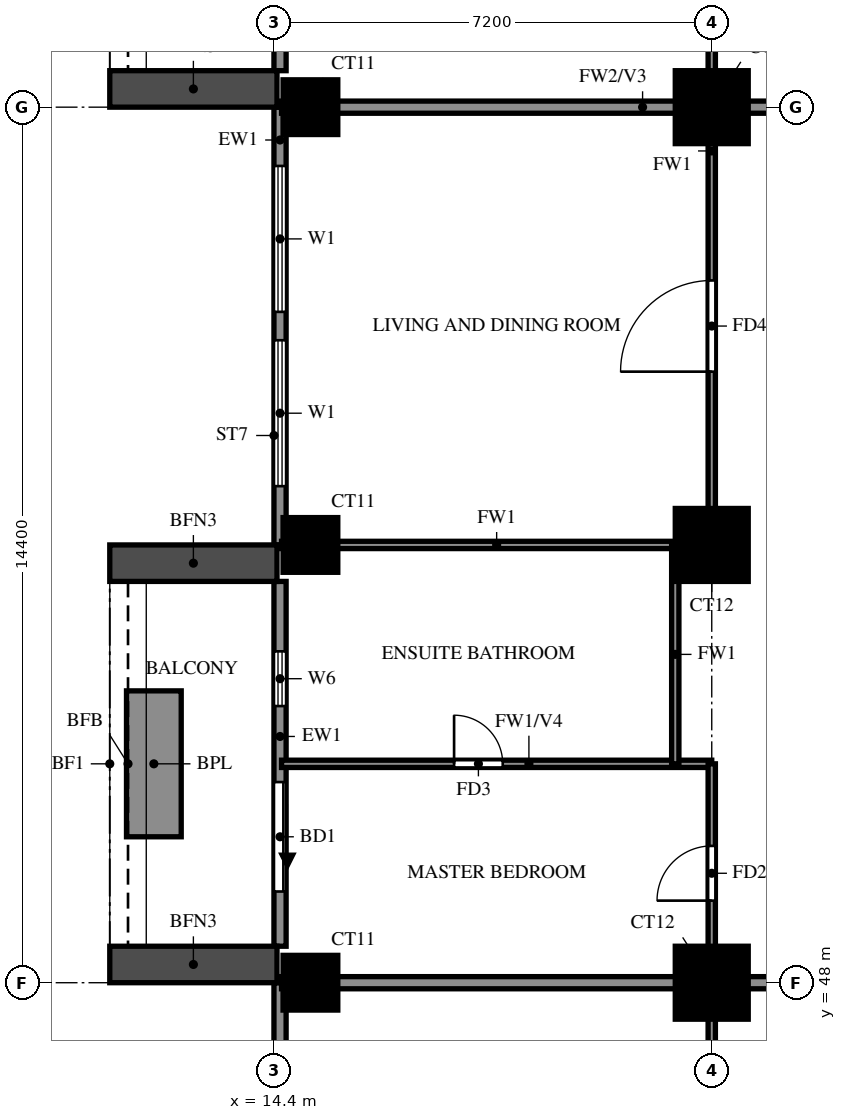
"""IFC4 building model, lengths in metres.
Left out: names, types, materials, properties, quantities, classifications, styles, units other than length and angle.
Written with IfcOpenShell. Run it as: python <this file> out.ifc"""

import sys

from ifc_helpers import new_model, si_unit, direction, frame, frame_2d, origin, origin_2d, place, context, subcontext, project, spatial, rectangle, extrude, source, transform, mapped, element, fill, save


model = new_model("IFC4")
c1 = context("Model", 3, precision=1e-05, world=origin(), true_north=direction((0.0, 1.0)))
c2 = subcontext(c1, "Body", "Model", "MODEL_VIEW")
j1 = project(units=[si_unit("LENGTHUNIT", "METRE"), si_unit("PLANEANGLEUNIT", "RADIAN")], contexts=[c1])
p1 = place(None, origin())
s1 = spatial("IfcSite", under=j1, at=p1, CompositionType="ELEMENT")
p2 = place(p1, origin())
s2 = spatial("IfcBuilding", under=s1, at=p2, CompositionType="ELEMENT")
p3 = place(p2, frame((0.0, 0.0, 100.5)))
s3 = spatial("IfcBuildingStorey", under=s2, at=p3, CompositionType="ELEMENT", Elevation=100.5)
m1 = source(origin(), c2, "Body", "SweptSolid", [
    extrude(rectangle(XDim=0.9, YDim=0.9, at=origin_2d()), origin(), (0.0, 0.0, 1.0), 3.18),
])
p4 = place(p3, frame((15.0, 48.0, 0.0), z_axis=(0.0, 0.0, 1.0), x_axis=(1.0, 0.0, 0.0)))
e1 = element("IfcColumn", 1, at=p4, inside=s3, PredefinedType="COLUMN", context=c2, shape_type="MappedRepresentation", body=[
    mapped(m1, transform((0.0, 0.0, 0.0))),
])
m2 = source(origin(), c2, "Body", "SweptSolid", [
    extrude(rectangle(XDim=1.2, YDim=1.2, at=origin_2d()), origin(), (0.0, 0.0, 1.0), 3.18),
])
p5 = place(p3, frame((21.6, 48.0, 0.0), z_axis=(0.0, 0.0, 1.0), x_axis=(1.0, 0.0, 0.0)))
e2 = element("IfcColumn", 2, at=p5, inside=s3, PredefinedType="COLUMN", context=c2, shape_type="MappedRepresentation", body=[
    mapped(m2, transform((0.0, 0.0, 0.0))),
])
p6 = place(p3, frame((15.0, 55.2, 0.0), z_axis=(0.0, 0.0, 1.0), x_axis=(1.0, 0.0, 0.0)))
e3 = element("IfcColumn", 3, at=p6, inside=s3, PredefinedType="COLUMN", context=c2, shape_type="MappedRepresentation", body=[
    mapped(m1, transform((0.0, 0.0, 0.0))),
])
p7 = place(p3, frame((21.6, 55.2, 0.0), z_axis=(0.0, 0.0, 1.0), x_axis=(1.0, 0.0, 0.0)))
e4 = element("IfcColumn", 4, at=p7, inside=s3, PredefinedType="COLUMN", context=c2, shape_type="MappedRepresentation", body=[
    mapped(m2, transform((0.0, 0.0, 0.0))),
])
p8 = place(p3, frame((15.0, 62.4, 0.0), z_axis=(0.0, 0.0, 1.0), x_axis=(1.0, 0.0, 0.0)))
e5 = element("IfcColumn", 5, at=p8, inside=s3, PredefinedType="COLUMN", context=c2, shape_type="MappedRepresentation", body=[
    mapped(m1, transform((0.0, 0.0, 0.0))),
])
p9 = place(p3, frame((21.6, 62.4, 0.0), z_axis=(0.0, 0.0, 1.0), x_axis=(1.0, 0.0, 0.0)))
e6 = element("IfcColumn", 6, at=p9, inside=s3, PredefinedType="COLUMN", context=c2, shape_type="MappedRepresentation", body=[
    mapped(m2, transform((0.0, 0.0, 0.0))),
])
p10 = place(p3, frame((14.5, 69.0, 0.0), z_axis=(0.0, 0.0, 1.0), x_axis=(0.0, -1.0, 0.0)))
e7 = element("IfcWall", 7, at=p10, inside=s3, PredefinedType="SOLIDWALL", context=c2, shape_type="SweptSolid", body=[
    extrude(rectangle(XDim=6.0, YDim=0.2, at=frame_2d((3.0, 0.0))), origin(), (0.0, 0.0, 1.0), 3.18),
])
p11 = place(p10, frame((0.9, 0.0, 0.0)))
e8 = element("IfcOpeningElement", 8, at=p11, cuts=e7, PredefinedType="OPENING", context=c2, shape_type="SweptSolid", body=[
    extrude(rectangle(XDim=1.8, YDim=2.4, at=frame_2d((0.9, 1.2))), frame((0.0, 0.11, 0.0), z_axis=(0.0, -1.0, 0.0), x_axis=(1.0, 0.0, 0.0)), (0.0, 0.0, 1.0), 0.22),
])
p12 = place(p10, frame((3.5, 0.0, 0.6)))
e9 = element("IfcOpeningElement", 9, at=p12, cuts=e7, PredefinedType="OPENING", context=c2, shape_type="SweptSolid", body=[
    extrude(rectangle(XDim=1.8, YDim=2.4, at=frame_2d((0.9, 1.2))), frame((0.0, 0.11, 0.0), z_axis=(0.0, -1.0, 0.0), x_axis=(1.0, 0.0, 0.0)), (0.0, 0.0, 1.0), 0.22),
])
p13 = place(p3, frame((14.5, 62.4, 0.0), z_axis=(0.0, 0.0, 1.0), x_axis=(0.0, -1.0, 0.0)))
e10 = element("IfcWall", 10, at=p13, inside=s3, PredefinedType="SOLIDWALL", context=c2, shape_type="SweptSolid", body=[
    extrude(rectangle(XDim=7.2, YDim=0.2, at=frame_2d((3.6, 0.0))), origin(), (0.0, 0.0, 1.0), 3.18),
])
p14 = place(p13, frame((0.967, 0.0, 0.6)))
e11 = element("IfcOpeningElement", 11, at=p14, cuts=e10, PredefinedType="OPENING", context=c2, shape_type="SweptSolid", body=[
    extrude(rectangle(XDim=2.4, YDim=2.4, at=frame_2d((1.2, 1.2))), frame((0.0, 0.11, 0.0), z_axis=(0.0, -1.0, 0.0), x_axis=(1.0, 0.0, 0.0)), (0.0, 0.0, 1.0), 0.22),
])
p15 = place(p13, frame((3.833, 0.0, 0.6)))
e12 = element("IfcOpeningElement", 12, at=p15, cuts=e10, PredefinedType="OPENING", context=c2, shape_type="SweptSolid", body=[
    extrude(rectangle(XDim=2.4, YDim=2.4, at=frame_2d((1.2, 1.2))), frame((0.0, 0.11, 0.0), z_axis=(0.0, -1.0, 0.0), x_axis=(1.0, 0.0, 0.0)), (0.0, 0.0, 1.0), 0.22),
])
p16 = place(p3, frame((14.5, 54.6, 0.0), z_axis=(0.0, 0.0, 1.0), x_axis=(0.0, -1.0, 0.0)))
e13 = element("IfcWall", 13, at=p16, inside=s3, PredefinedType="SOLIDWALL", context=c2, shape_type="SweptSolid", body=[
    extrude(rectangle(XDim=6.0, YDim=0.2, at=frame_2d((3.0, 0.0))), origin(), (0.0, 0.0, 1.0), 3.18),
])
p17 = place(p16, frame((3.3, 0.0, 0.0)))
e14 = element("IfcOpeningElement", 14, at=p17, cuts=e13, PredefinedType="OPENING", context=c2, shape_type="SweptSolid", body=[
    extrude(rectangle(XDim=1.8, YDim=2.4, at=frame_2d((0.9, 1.2))), frame((0.0, 0.11, 0.0), z_axis=(0.0, -1.0, 0.0), x_axis=(1.0, 0.0, 0.0)), (0.0, 0.0, 1.0), 0.22),
])
p18 = place(p16, frame((1.15, 0.0, 1.5)))
e15 = element("IfcOpeningElement", 15, at=p18, cuts=e13, PredefinedType="OPENING", context=c2, shape_type="SweptSolid", body=[
    extrude(rectangle(XDim=0.9, YDim=0.9, at=frame_2d((0.45, 0.45))), frame((0.0, 0.11, 0.0), z_axis=(0.0, -1.0, 0.0), x_axis=(1.0, 0.0, 0.0)), (0.0, 0.0, 1.0), 0.22),
])
p19 = place(p3, frame((14.5, 48.0, 0.0), z_axis=(0.0, 0.0, 1.0), x_axis=(0.0, -1.0, 0.0)))
e16 = element("IfcWall", 16, at=p19, inside=s3, PredefinedType="SOLIDWALL", context=c2, shape_type="SweptSolid", body=[
    extrude(rectangle(XDim=10.8, YDim=0.2, at=frame_2d((5.4, 0.0))), origin(), (0.0, 0.0, 1.0), 3.18),
])
p20 = place(p19, frame((0.967, 0.0, 0.6)))
e17 = element("IfcOpeningElement", 17, at=p20, cuts=e16, PredefinedType="OPENING", context=c2, shape_type="SweptSolid", body=[
    extrude(rectangle(XDim=2.4, YDim=2.4, at=frame_2d((1.2, 1.2))), frame((0.0, 0.11, 0.0), z_axis=(0.0, -1.0, 0.0), x_axis=(1.0, 0.0, 0.0)), (0.0, 0.0, 1.0), 0.22),
])
p21 = place(p19, frame((3.833, 0.0, 0.6)))
e18 = element("IfcOpeningElement", 18, at=p21, cuts=e16, PredefinedType="OPENING", context=c2, shape_type="SweptSolid", body=[
    extrude(rectangle(XDim=2.4, YDim=2.4, at=frame_2d((1.2, 1.2))), frame((0.0, 0.11, 0.0), z_axis=(0.0, -1.0, 0.0), x_axis=(1.0, 0.0, 0.0)), (0.0, 0.0, 1.0), 0.22),
])
p22 = place(p19, frame((8.2, 0.0, 0.6)))
e19 = element("IfcOpeningElement", 19, at=p22, cuts=e16, PredefinedType="OPENING", context=c2, shape_type="SweptSolid", body=[
    extrude(rectangle(XDim=1.8, YDim=2.4, at=frame_2d((0.9, 1.2))), frame((0.0, 0.11, 0.0), z_axis=(0.0, -1.0, 0.0), x_axis=(1.0, 0.0, 0.0)), (0.0, 0.0, 1.0), 0.22),
])
for number, where, z_axis, x_axis in (
    (20, (14.45, 62.7, 0.0), (0.0, 0.0, 1.0), (-1.0, 0.0, 0.0)),
    (21, (14.45, 54.9, 0.0), (0.0, 0.0, 1.0), (-1.0, 0.0, 0.0)),
    (22, (14.45, 48.3, 0.0), (0.0, 0.0, 1.0), (-1.0, 0.0, 0.0)),
):
    element("IfcWall", number, at=place(p3, frame(where, z_axis=z_axis, x_axis=x_axis)), inside=s3, PredefinedType="SOLIDWALL", context=c2, shape_type="SweptSolid", body=[
        extrude(rectangle(XDim=2.75, YDim=0.6, at=frame_2d((1.375, 0.0))), origin(), (0.0, 0.0, 1.0), 2.85),
    ])
p23 = place(p3, frame((12.425, 52.8, 0.0), z_axis=(0.0, 0.0, 1.0), x_axis=(0.0, -1.0, 0.0)))
e23 = element("IfcWall", 23, at=p23, inside=s3, PredefinedType="SOLIDWALL", context=c2, shape_type="SweptSolid", body=[
    extrude(rectangle(XDim=2.4, YDim=0.9, at=frame_2d((1.2, 0.0))), origin(), (0.0, 0.0, 1.0), 0.9),
])
p24 = place(p3, frame((14.525, 48.0, 0.0), z_axis=(0.0, 0.0, 1.0), x_axis=(1.0, 0.0, 0.0)))
e24 = element("IfcWall", 24, at=p24, inside=s3, PredefinedType="SOLIDWALL", context=c2, shape_type="SweptSolid", body=[
    extrude(rectangle(XDim=19.075, YDim=0.2, at=frame_2d((9.538, 0.0))), origin(), (0.0, 0.0, 1.0), 3.18),
])
p25 = place(p3, frame((14.525, 62.4, 0.0), z_axis=(0.0, 0.0, 1.0), x_axis=(1.0, 0.0, 0.0)))
e25 = element("IfcWall", 25, at=p25, inside=s3, PredefinedType="SOLIDWALL", context=c2, shape_type="SweptSolid", body=[
    extrude(rectangle(XDim=11.875, YDim=0.2, at=frame_2d((5.938, 0.0))), origin(), (0.0, 0.0, 1.0), 3.18),
])
p26 = place(p3, frame((14.525, 51.6, 0.0), z_axis=(0.0, 0.0, 1.0), x_axis=(1.0, 0.0, 0.0)))
e26 = element("IfcWall", 26, at=p26, inside=s3, PredefinedType="PARTITIONING", context=c2, shape_type="SweptSolid", body=[
    extrude(rectangle(XDim=7.075, YDim=0.12, at=frame_2d((3.538, 0.0))), origin(), (0.0, 0.0, 1.0), 2.28),
])
p27 = place(p26, frame((2.837, 0.0, 0.0)))
e27 = element("IfcOpeningElement", 27, at=p27, cuts=e26, PredefinedType="OPENING", context=c2, shape_type="SweptSolid", body=[
    extrude(rectangle(XDim=0.8, YDim=2.1, at=frame_2d((0.4, 1.05))), frame((0.0, 0.07, 0.0), z_axis=(0.0, -1.0, 0.0), x_axis=(1.0, 0.0, 0.0)), (0.0, 0.0, 1.0), 0.14),
])
p28 = place(p3, frame((14.525, 55.2, 0.0), z_axis=(0.0, 0.0, 1.0), x_axis=(1.0, 0.0, 0.0)))
e28 = element("IfcWall", 28, at=p28, inside=s3, PredefinedType="PARTITIONING", context=c2, shape_type="SweptSolid", body=[
    extrude(rectangle(XDim=7.075, YDim=0.12, at=frame_2d((3.538, 0.0))), origin(), (0.0, 0.0, 1.0), 3.18),
])
p29 = place(p3, frame((21.0, 51.6, 0.0), z_axis=(0.0, 0.0, 1.0), x_axis=(0.0, 1.0, 0.0)))
e29 = element("IfcWall", 29, at=p29, inside=s3, PredefinedType="PARTITIONING", context=c2, shape_type="SweptSolid", body=[
    extrude(rectangle(XDim=3.6, YDim=0.12, at=frame_2d((1.8, 0.0))), origin(), (0.0, 0.0, 1.0), 3.18),
])
p30 = place(p3, frame((21.6, 33.725, 0.0), z_axis=(0.0, 0.0, 1.0), x_axis=(0.0, 1.0, 0.0)))
e30 = element("IfcWall", 30, at=p30, inside=s3, PredefinedType="PARTITIONING", context=c2, shape_type="SweptSolid", body=[
    extrude(rectangle(XDim=17.875, YDim=0.12, at=frame_2d((8.938, 0.0))), origin(), (0.0, 0.0, 1.0), 3.18),
])
p31 = place(p30, frame((7.775, 0.0, 0.0)))
e31 = element("IfcOpeningElement", 31, at=p31, cuts=e30, PredefinedType="OPENING", context=c2, shape_type="SweptSolid", body=[
    extrude(rectangle(XDim=0.9, YDim=2.1, at=frame_2d((0.45, 1.05))), frame((0.0, 0.07, 0.0), z_axis=(0.0, -1.0, 0.0), x_axis=(1.0, 0.0, 0.0)), (0.0, 0.0, 1.0), 0.14),
])
p32 = place(p30, frame((15.625, 0.0, 0.0)))
e32 = element("IfcOpeningElement", 32, at=p32, cuts=e30, PredefinedType="OPENING", context=c2, shape_type="SweptSolid", body=[
    extrude(rectangle(XDim=0.9, YDim=2.1, at=frame_2d((0.45, 1.05))), frame((0.0, 0.07, 0.0), z_axis=(0.0, -1.0, 0.0), x_axis=(1.0, 0.0, 0.0)), (0.0, 0.0, 1.0), 0.14),
])
p33 = place(p3, frame((21.6, 55.2, 0.0), z_axis=(0.0, 0.0, 1.0), x_axis=(0.0, 1.0, 0.0)))
e33 = element("IfcWall", 33, at=p33, inside=s3, PredefinedType="PARTITIONING", context=c2, shape_type="SweptSolid", body=[
    extrude(rectangle(XDim=14.4, YDim=0.12, at=frame_2d((7.2, 0.0))), origin(), (0.0, 0.0, 1.0), 3.18),
])
p34 = place(p33, frame((2.85, 0.0, 0.0)))
e34 = element("IfcOpeningElement", 34, at=p34, cuts=e33, PredefinedType="OPENING", context=c2, shape_type="SweptSolid", body=[
    extrude(rectangle(XDim=1.5, YDim=2.1, at=frame_2d((0.75, 1.05))), frame((0.0, 0.07, 0.0), z_axis=(0.0, -1.0, 0.0), x_axis=(1.0, 0.0, 0.0)), (0.0, 0.0, 1.0), 0.14),
])
p35 = place(p33, frame((8.55, 0.0, 0.0)))
e35 = element("IfcOpeningElement", 35, at=p35, cuts=e33, PredefinedType="OPENING", context=c2, shape_type="SweptSolid", body=[
    extrude(rectangle(XDim=0.9, YDim=2.1, at=frame_2d((0.45, 1.05))), frame((0.0, 0.07, 0.0), z_axis=(0.0, -1.0, 0.0), x_axis=(1.0, 0.0, 0.0)), (0.0, 0.0, 1.0), 0.14),
])
p36 = place(p33, frame((12.15, 0.0, 0.0)))
e36 = element("IfcOpeningElement", 36, at=p36, cuts=e33, PredefinedType="OPENING", context=c2, shape_type="SweptSolid", body=[
    extrude(rectangle(XDim=0.9, YDim=2.1, at=frame_2d((0.45, 1.05))), frame((0.0, 0.07, 0.0), z_axis=(0.0, -1.0, 0.0), x_axis=(1.0, 0.0, 0.0)), (0.0, 0.0, 1.0), 0.14),
])
p37 = place(p14, origin())
e37 = element("IfcWindow", 37, at=p37, inside=s3, PartitioningType="DOUBLE_PANEL_VERTICAL", PredefinedType="WINDOW", context=c2, shape_type="SweptSolid", body=[
    extrude(rectangle(XDim=2.4, YDim=2.4, at=frame_2d((1.2, 1.2))), frame((0.0, 0.03, 0.0), z_axis=(0.0, -1.0, 0.0), x_axis=(1.0, 0.0, 0.0)), (0.0, 0.0, 1.0), 0.06),
])
fill(e11, e37)
p38 = place(p15, origin())
e38 = element("IfcWindow", 38, at=p38, inside=s3, PartitioningType="DOUBLE_PANEL_VERTICAL", PredefinedType="WINDOW", context=c2, shape_type="SweptSolid", body=[
    extrude(rectangle(XDim=2.4, YDim=2.4, at=frame_2d((1.2, 1.2))), frame((0.0, 0.03, 0.0), z_axis=(0.0, -1.0, 0.0), x_axis=(1.0, 0.0, 0.0)), (0.0, 0.0, 1.0), 0.06),
])
fill(e12, e38)
p39 = place(p17, origin())
e39 = element("IfcDoor", 39, at=p39, inside=s3, OperationType="DOUBLE_DOOR_SLIDING", PredefinedType="DOOR", context=c2, shape_type="SweptSolid", body=[
    extrude(rectangle(XDim=1.8, YDim=2.4, at=frame_2d((0.9, 1.2))), frame((0.0, 0.025, 0.0), z_axis=(0.0, -1.0, 0.0), x_axis=(1.0, 0.0, 0.0)), (0.0, 0.0, 1.0), 0.05),
])
fill(e14, e39)
p40 = place(p18, origin())
e40 = element("IfcWindow", 40, at=p40, inside=s3, PartitioningType="SINGLE_PANEL", PredefinedType="WINDOW", context=c2, shape_type="SweptSolid", body=[
    extrude(rectangle(XDim=0.9, YDim=0.9, at=frame_2d((0.45, 0.45))), frame((0.0, 0.03, 0.0), z_axis=(0.0, -1.0, 0.0), x_axis=(1.0, 0.0, 0.0)), (0.0, 0.0, 1.0), 0.06),
])
fill(e15, e40)
p41 = place(p32, origin())
e41 = element("IfcDoor", 41, at=p41, inside=s3, OperationType="SINGLE_SWING_LEFT", PredefinedType="DOOR", context=c2, shape_type="SweptSolid", body=[
    extrude(rectangle(XDim=0.9, YDim=2.1, at=frame_2d((0.45, 1.05))), frame((0.0, 0.025, 0.0), z_axis=(0.0, -1.0, 0.0), x_axis=(1.0, 0.0, 0.0)), (0.0, 0.0, 1.0), 0.05),
])
fill(e32, e41)
p42 = place(p27, origin())
e42 = element("IfcDoor", 42, at=p42, inside=s3, OperationType="SINGLE_SWING_RIGHT", PredefinedType="DOOR", context=c2, shape_type="SweptSolid", body=[
    extrude(rectangle(XDim=0.8, YDim=2.1, at=frame_2d((0.4, 1.05))), frame((0.0, 0.025, 0.0), z_axis=(0.0, -1.0, 0.0), x_axis=(1.0, 0.0, 0.0)), (0.0, 0.0, 1.0), 0.05),
])
fill(e27, e42)
p43 = place(p34, origin())
e43 = element("IfcDoor", 43, at=p43, inside=s3, OperationType="SINGLE_SWING_LEFT", PredefinedType="DOOR", context=c2, shape_type="SweptSolid", body=[
    extrude(rectangle(XDim=1.5, YDim=2.1, at=frame_2d((0.75, 1.05))), frame((0.0, 0.025, 0.0), z_axis=(0.0, -1.0, 0.0), x_axis=(1.0, 0.0, 0.0)), (0.0, 0.0, 1.0), 0.05),
])
fill(e34, e43)
save(model, sys.argv[1])
